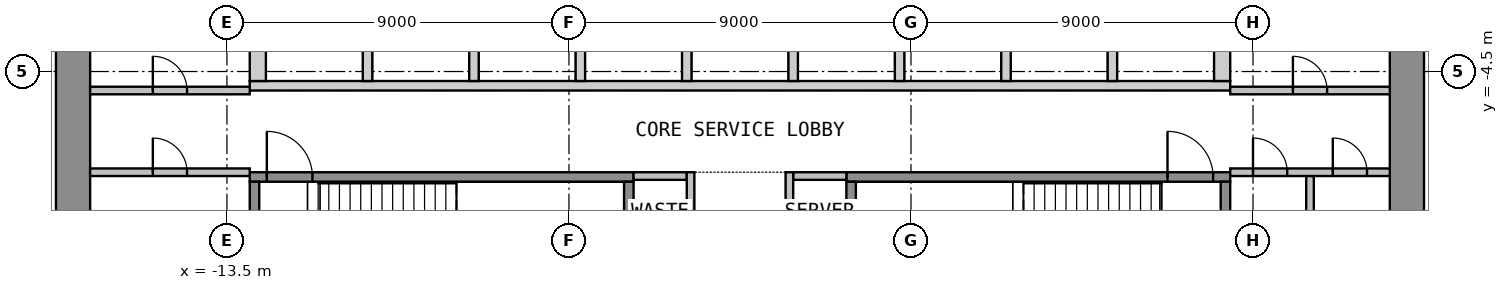
"""IFC4 building model, lengths in metres.
Left out: names, types, materials, properties, quantities, classifications, styles, units other than length and angle.
Written with IfcOpenShell. Run it as: python <this file> out.ifc"""

import sys

from ifc_helpers import new_model, si_unit, direction, frame, frame_2d, origin, place, context, subcontext, project, spatial, polyline, rectangle, outline, extrude, element, fill, save


model = new_model("IFC4")
c1 = context("Model", 3, precision=1e-05, world=origin(), true_north=direction((0.0, 1.0)))
c2 = subcontext(c1, "Body", "Model", "MODEL_VIEW")
j1 = project(units=[si_unit("LENGTHUNIT", "METRE"), si_unit("PLANEANGLEUNIT", "RADIAN")], contexts=[c1])
p1 = place(None, origin())
s1 = spatial("IfcSite", under=j1, at=p1, CompositionType="ELEMENT")
p2 = place(p1, origin())
s2 = spatial("IfcBuilding", under=s1, at=p2, CompositionType="ELEMENT")
p3 = place(p2, frame((0.0, 0.0, 15.6)))
s3 = spatial("IfcBuildingStorey", under=s2, at=p3, CompositionType="ELEMENT", Elevation=15.6)
p4 = place(p3, frame((-17.55, -12.6, 0.0), z_axis=(0.0, 0.0, 1.0), x_axis=(0.0, 1.0, 0.0)))
e1 = element("IfcWall", 1, at=p4, inside=s3, PredefinedType="SHEAR", context=c2, shape_type="SweptSolid", body=[
    extrude(rectangle(XDim=25.2, YDim=0.9, at=frame_2d((12.6, 0.0))), origin(), (0.0, 0.0, 1.0), 4.4),
])
p5 = place(p4, frame((11.4, 0.0, 0.0)))
e2 = element("IfcOpeningElement", 2, at=p5, cuts=e1, PredefinedType="OPENING", context=c2, shape_type="SweptSolid", body=[
    extrude(rectangle(XDim=2.4, YDim=2.1, at=frame_2d((1.2, 1.05))), frame((0.0, 0.46, 0.0), z_axis=(0.0, -1.0, 0.0), x_axis=(1.0, 0.0, 0.0)), (0.0, 0.0, 1.0), 0.92),
])
p6 = place(p3, frame((17.55, -12.6, 0.0), z_axis=(0.0, 0.0, 1.0), x_axis=(0.0, 1.0, 0.0)))
e3 = element("IfcWall", 3, at=p6, inside=s3, PredefinedType="SHEAR", context=c2, shape_type="SweptSolid", body=[
    extrude(rectangle(XDim=25.2, YDim=0.9, at=frame_2d((12.6, 0.0))), origin(), (0.0, 0.0, 1.0), 4.4),
])
p7 = place(p6, frame((11.4, 0.0, 0.0)))
e4 = element("IfcOpeningElement", 4, at=p7, cuts=e3, PredefinedType="OPENING", context=c2, shape_type="SweptSolid", body=[
    extrude(rectangle(XDim=2.4, YDim=2.1, at=frame_2d((1.2, 1.05))), frame((0.0, 0.46, 0.0), z_axis=(0.0, -1.0, 0.0), x_axis=(1.0, 0.0, 0.0)), (0.0, 0.0, 1.0), 0.92),
])
p8 = place(p3, origin())
e5 = element("IfcWall", 5, at=p8, inside=s3, PredefinedType="SHEAR", context=c2, shape_type="SweptSolid", body=[
    extrude(outline(polyline([(-12.9, -5.0), (12.9, -5.0), (12.9, -4.75), (-12.9, -4.75), (-12.9, -5.0)])), origin(), (0.0, 0.0, 1.0), 4.4),
])
p9 = place(p3, origin())
e6 = element("IfcWall", 6, at=p9, inside=s3, PredefinedType="SHEAR", context=c2, shape_type="SweptSolid", body=[
    extrude(outline(polyline([(-12.9, -4.75), (-12.475, -4.75), (-12.475, -2.05), (-12.9, -2.05), (-12.9, -4.75)])), origin(), (0.0, 0.0, 1.0), 4.4),
])
p10 = place(p3, origin())
e7 = element("IfcWall", 7, at=p10, inside=s3, PredefinedType="SHEAR", context=c2, shape_type="SweptSolid", body=[
    extrude(outline(polyline([(-9.925, -4.75), (-9.675, -4.75), (-9.675, -2.05), (-9.925, -2.05), (-9.925, -4.75)])), origin(), (0.0, 0.0, 1.0), 4.4),
])
p11 = place(p3, origin())
e8 = element("IfcWall", 8, at=p11, inside=s3, PredefinedType="SHEAR", context=c2, shape_type="SweptSolid", body=[
    extrude(outline(polyline([(-7.125, -4.75), (-6.875, -4.75), (-6.875, -2.05), (-7.125, -2.05), (-7.125, -4.75)])), origin(), (0.0, 0.0, 1.0), 4.4),
])
p12 = place(p3, origin())
e9 = element("IfcWall", 9, at=p12, inside=s3, PredefinedType="SHEAR", context=c2, shape_type="SweptSolid", body=[
    extrude(outline(polyline([(-4.325, -4.75), (-4.075, -4.75), (-4.075, -2.05), (-4.325, -2.05), (-4.325, -4.75)])), origin(), (0.0, 0.0, 1.0), 4.4),
])
p13 = place(p3, origin())
e10 = element("IfcWall", 10, at=p13, inside=s3, PredefinedType="SHEAR", context=c2, shape_type="SweptSolid", body=[
    extrude(outline(polyline([(-1.525, -4.75), (-1.275, -4.75), (-1.275, -2.05), (-1.525, -2.05), (-1.525, -4.75)])), origin(), (0.0, 0.0, 1.0), 4.4),
])
p14 = place(p3, origin())
e11 = element("IfcWall", 11, at=p14, inside=s3, PredefinedType="SHEAR", context=c2, shape_type="SweptSolid", body=[
    extrude(outline(polyline([(1.275, -4.75), (1.525, -4.75), (1.525, -2.05), (1.275, -2.05), (1.275, -4.75)])), origin(), (0.0, 0.0, 1.0), 4.4),
])
p15 = place(p3, origin())
e12 = element("IfcWall", 12, at=p15, inside=s3, PredefinedType="SHEAR", context=c2, shape_type="SweptSolid", body=[
    extrude(outline(polyline([(4.075, -4.75), (4.325, -4.75), (4.325, -2.05), (4.075, -2.05), (4.075, -4.75)])), origin(), (0.0, 0.0, 1.0), 4.4),
])
p16 = place(p3, origin())
e13 = element("IfcWall", 13, at=p16, inside=s3, PredefinedType="SHEAR", context=c2, shape_type="SweptSolid", body=[
    extrude(outline(polyline([(6.875, -4.75), (7.125, -4.75), (7.125, -2.05), (6.875, -2.05), (6.875, -4.75)])), origin(), (0.0, 0.0, 1.0), 4.4),
])
p17 = place(p3, origin())
e14 = element("IfcWall", 14, at=p17, inside=s3, PredefinedType="SHEAR", context=c2, shape_type="SweptSolid", body=[
    extrude(outline(polyline([(9.675, -4.75), (9.925, -4.75), (9.925, -2.05), (9.675, -2.05), (9.675, -4.75)])), origin(), (0.0, 0.0, 1.0), 4.4),
])
p18 = place(p3, origin())
e15 = element("IfcWall", 15, at=p18, inside=s3, PredefinedType="SHEAR", context=c2, shape_type="SweptSolid", body=[
    extrude(outline(polyline([(12.475, -4.75), (12.9, -4.75), (12.9, -2.05), (12.475, -2.05), (12.475, -4.75)])), origin(), (0.0, 0.0, 1.0), 4.4),
])
p19 = place(p3, frame((-12.9, -7.275, 0.0), z_axis=(0.0, 0.0, 1.0), x_axis=(1.0, 0.0, 0.0)))
e16 = element("IfcWall", 16, at=p19, inside=s3, PredefinedType="SHEAR", context=c2, shape_type="SweptSolid", body=[
    extrude(rectangle(XDim=10.1, YDim=0.25, at=frame_2d((5.05, 0.0))), origin(), (0.0, 0.0, 1.0), 4.4),
])
p20 = place(p19, frame((0.45, 0.0, 0.0)))
e17 = element("IfcOpeningElement", 17, at=p20, cuts=e16, PredefinedType="OPENING", context=c2, shape_type="SweptSolid", body=[
    extrude(rectangle(XDim=1.2, YDim=2.1, at=frame_2d((0.6, 1.05))), frame((0.0, 0.135, 0.0), z_axis=(0.0, -1.0, 0.0), x_axis=(1.0, 0.0, 0.0)), (0.0, 0.0, 1.0), 0.27),
])
for number, where, z_axis, x_axis in (
    (18, (-12.775, -10.65, 0.0), (0.0, 0.0, 1.0), (0.0, 1.0, 0.0)),
    (19, (-2.925, -10.65, 0.0), (0.0, 0.0, 1.0), (0.0, 1.0, 0.0)),
):
    element("IfcWall", number, at=place(p3, frame(where, z_axis=z_axis, x_axis=x_axis)), inside=s3, PredefinedType="SHEAR", context=c2, shape_type="SweptSolid", body=[
        extrude(rectangle(XDim=3.25, YDim=0.25, at=frame_2d((1.625, 0.0))), origin(), (0.0, 0.0, 1.0), 4.4),
    ])
p21 = place(p3, frame((2.8, -7.275, 0.0), z_axis=(0.0, 0.0, 1.0), x_axis=(1.0, 0.0, 0.0)))
e20 = element("IfcWall", 20, at=p21, inside=s3, PredefinedType="SHEAR", context=c2, shape_type="SweptSolid", body=[
    extrude(rectangle(XDim=10.1, YDim=0.25, at=frame_2d((5.05, 0.0))), origin(), (0.0, 0.0, 1.0), 4.4),
])
p22 = place(p21, frame((8.45, 0.0, 0.0)))
e21 = element("IfcOpeningElement", 21, at=p22, cuts=e20, PredefinedType="OPENING", context=c2, shape_type="SweptSolid", body=[
    extrude(rectangle(XDim=1.2, YDim=2.1, at=frame_2d((0.6, 1.05))), frame((0.0, 0.135, 0.0), z_axis=(0.0, -1.0, 0.0), x_axis=(1.0, 0.0, 0.0)), (0.0, 0.0, 1.0), 0.27),
])
for number, where, z_axis, x_axis in (
    (22, (2.925, -10.65, 0.0), (0.0, 0.0, 1.0), (0.0, 1.0, 0.0)),
    (23, (12.775, -10.65, 0.0), (0.0, 0.0, 1.0), (0.0, 1.0, 0.0)),
):
    element("IfcWall", number, at=place(p3, frame(where, z_axis=z_axis, x_axis=x_axis)), inside=s3, PredefinedType="SHEAR", context=c2, shape_type="SweptSolid", body=[
        extrude(rectangle(XDim=3.25, YDim=0.25, at=frame_2d((1.625, 0.0))), origin(), (0.0, 0.0, 1.0), 4.4),
    ])
for number, where, z_axis, x_axis in (
    (24, (-2.8, -7.25, 0.0), (0.0, 0.0, 1.0), (1.0, 0.0, 0.0)),
    (25, (1.4, -7.25, 0.0), (0.0, 0.0, 1.0), (1.0, 0.0, 0.0)),
):
    element("IfcWall", number, at=place(p3, frame(where, z_axis=z_axis, x_axis=x_axis)), inside=s3, PredefinedType="PARTITIONING", context=c2, shape_type="SweptSolid", body=[
        extrude(rectangle(XDim=1.4, YDim=0.2, at=frame_2d((0.7, 0.0))), origin(), (0.0, 0.0, 1.0), 4.4),
    ])
p23 = place(p3, frame((-1.3, -12.6, 0.0), z_axis=(0.0, 0.0, 1.0), x_axis=(0.0, 1.0, 0.0)))
e26 = element("IfcWall", 26, at=p23, inside=s3, PredefinedType="PARTITIONING", context=c2, shape_type="SweptSolid", body=[
    extrude(rectangle(XDim=5.45, YDim=0.2, at=frame_2d((2.725, 0.0))), origin(), (0.0, 0.0, 1.0), 4.4),
])
p24 = place(p23, frame((0.337, 0.0, 0.0)))
e27 = element("IfcOpeningElement", 27, at=p24, cuts=e26, PredefinedType="OPENING", context=c2, shape_type="SweptSolid", body=[
    extrude(rectangle(XDim=0.9, YDim=2.1, at=frame_2d((0.45, 1.05))), frame((0.0, 0.11, 0.0), z_axis=(0.0, -1.0, 0.0), x_axis=(1.0, 0.0, 0.0)), (0.0, 0.0, 1.0), 0.22),
])
p25 = place(p23, frame((2.962, 0.0, 0.0)))
e28 = element("IfcOpeningElement", 28, at=p25, cuts=e26, PredefinedType="OPENING", context=c2, shape_type="SweptSolid", body=[
    extrude(rectangle(XDim=0.9, YDim=2.1, at=frame_2d((0.45, 1.05))), frame((0.0, 0.11, 0.0), z_axis=(0.0, -1.0, 0.0), x_axis=(1.0, 0.0, 0.0)), (0.0, 0.0, 1.0), 0.22),
])
p26 = place(p3, frame((1.3, -12.6, 0.0), z_axis=(0.0, 0.0, 1.0), x_axis=(0.0, 1.0, 0.0)))
e29 = element("IfcWall", 29, at=p26, inside=s3, PredefinedType="PARTITIONING", context=c2, shape_type="SweptSolid", body=[
    extrude(rectangle(XDim=5.45, YDim=0.2, at=frame_2d((2.725, 0.0))), origin(), (0.0, 0.0, 1.0), 4.4),
])
p27 = place(p26, frame((0.337, 0.0, 0.0)))
e30 = element("IfcOpeningElement", 30, at=p27, cuts=e29, PredefinedType="OPENING", context=c2, shape_type="SweptSolid", body=[
    extrude(rectangle(XDim=0.9, YDim=2.1, at=frame_2d((0.45, 1.05))), frame((0.0, 0.11, 0.0), z_axis=(0.0, -1.0, 0.0), x_axis=(1.0, 0.0, 0.0)), (0.0, 0.0, 1.0), 0.22),
])
p28 = place(p26, frame((2.962, 0.0, 0.0)))
e31 = element("IfcOpeningElement", 31, at=p28, cuts=e29, PredefinedType="OPENING", context=c2, shape_type="SweptSolid", body=[
    extrude(rectangle(XDim=0.9, YDim=2.1, at=frame_2d((0.45, 1.05))), frame((0.0, 0.11, 0.0), z_axis=(0.0, -1.0, 0.0), x_axis=(1.0, 0.0, 0.0)), (0.0, 0.0, 1.0), 0.22),
])
p29 = place(p3, frame((-17.1, -7.15, 0.0), z_axis=(0.0, 0.0, 1.0), x_axis=(1.0, 0.0, 0.0)))
e32 = element("IfcWall", 32, at=p29, inside=s3, PredefinedType="PARTITIONING", context=c2, shape_type="SweptSolid", body=[
    extrude(rectangle(XDim=4.2, YDim=0.2, at=frame_2d((2.1, 0.0))), origin(), (0.0, 0.0, 1.0), 4.4),
])
p30 = place(p29, frame((1.65, 0.0, 0.0)))
e33 = element("IfcOpeningElement", 33, at=p30, cuts=e32, PredefinedType="OPENING", context=c2, shape_type="SweptSolid", body=[
    extrude(rectangle(XDim=0.9, YDim=2.1, at=frame_2d((0.45, 1.05))), frame((0.0, 0.11, 0.0), z_axis=(0.0, -1.0, 0.0), x_axis=(1.0, 0.0, 0.0)), (0.0, 0.0, 1.0), 0.22),
])
p31 = place(p3, frame((-17.1, -5.0, 0.0), z_axis=(0.0, 0.0, 1.0), x_axis=(1.0, 0.0, 0.0)))
e34 = element("IfcWall", 34, at=p31, inside=s3, PredefinedType="PARTITIONING", context=c2, shape_type="SweptSolid", body=[
    extrude(rectangle(XDim=4.2, YDim=0.2, at=frame_2d((2.1, 0.0))), origin(), (0.0, 0.0, 1.0), 4.4),
])
p32 = place(p31, frame((1.65, 0.0, 0.0)))
e35 = element("IfcOpeningElement", 35, at=p32, cuts=e34, PredefinedType="OPENING", context=c2, shape_type="SweptSolid", body=[
    extrude(rectangle(XDim=0.9, YDim=2.1, at=frame_2d((0.45, 1.05))), frame((0.0, 0.11, 0.0), z_axis=(0.0, -1.0, 0.0), x_axis=(1.0, 0.0, 0.0)), (0.0, 0.0, 1.0), 0.22),
])
p33 = place(p3, frame((15.0, -12.6, 0.0), z_axis=(0.0, 0.0, 1.0), x_axis=(0.0, 1.0, 0.0)))
e36 = element("IfcWall", 36, at=p33, inside=s3, PredefinedType="PARTITIONING", context=c2, shape_type="SweptSolid", body=[
    extrude(rectangle(XDim=5.45, YDim=0.2, at=frame_2d((2.725, 0.0))), origin(), (0.0, 0.0, 1.0), 4.4),
])
p34 = place(p3, frame((12.9, -7.15, 0.0), z_axis=(0.0, 0.0, 1.0), x_axis=(1.0, 0.0, 0.0)))
e37 = element("IfcWall", 37, at=p34, inside=s3, PredefinedType="PARTITIONING", context=c2, shape_type="SweptSolid", body=[
    extrude(rectangle(XDim=4.2, YDim=0.2, at=frame_2d((2.1, 0.0))), origin(), (0.0, 0.0, 1.0), 4.4),
])
p35 = place(p34, frame((0.6, 0.0, 0.0)))
e38 = element("IfcOpeningElement", 38, at=p35, cuts=e37, PredefinedType="OPENING", context=c2, shape_type="SweptSolid", body=[
    extrude(rectangle(XDim=0.9, YDim=2.1, at=frame_2d((0.45, 1.05))), frame((0.0, 0.11, 0.0), z_axis=(0.0, -1.0, 0.0), x_axis=(1.0, 0.0, 0.0)), (0.0, 0.0, 1.0), 0.22),
])
p36 = place(p34, frame((2.7, 0.0, 0.0)))
e39 = element("IfcOpeningElement", 39, at=p36, cuts=e37, PredefinedType="OPENING", context=c2, shape_type="SweptSolid", body=[
    extrude(rectangle(XDim=0.9, YDim=2.1, at=frame_2d((0.45, 1.05))), frame((0.0, 0.11, 0.0), z_axis=(0.0, -1.0, 0.0), x_axis=(1.0, 0.0, 0.0)), (0.0, 0.0, 1.0), 0.22),
])
p37 = place(p3, frame((12.9, -5.0, 0.0), z_axis=(0.0, 0.0, 1.0), x_axis=(1.0, 0.0, 0.0)))
e40 = element("IfcWall", 40, at=p37, inside=s3, PredefinedType="PARTITIONING", context=c2, shape_type="SweptSolid", body=[
    extrude(rectangle(XDim=4.2, YDim=0.2, at=frame_2d((2.1, 0.0))), origin(), (0.0, 0.0, 1.0), 4.4),
])
p38 = place(p37, frame((1.65, 0.0, 0.0)))
e41 = element("IfcOpeningElement", 41, at=p38, cuts=e40, PredefinedType="OPENING", context=c2, shape_type="SweptSolid", body=[
    extrude(rectangle(XDim=0.9, YDim=2.1, at=frame_2d((0.45, 1.05))), frame((0.0, 0.11, 0.0), z_axis=(0.0, -1.0, 0.0), x_axis=(1.0, 0.0, 0.0)), (0.0, 0.0, 1.0), 0.22),
])
p39 = place(p20, origin())
e42 = element("IfcDoor", 42, at=p39, inside=s3, OperationType="SINGLE_SWING_LEFT", PredefinedType="DOOR", context=c2, shape_type="SweptSolid", body=[
    extrude(rectangle(XDim=1.2, YDim=2.1, at=frame_2d((0.6, 1.05))), frame((0.0, 0.025, 0.0), z_axis=(0.0, -1.0, 0.0), x_axis=(1.0, 0.0, 0.0)), (0.0, 0.0, 1.0), 0.05),
])
fill(e17, e42)
p40 = place(p22, origin())
e43 = element("IfcDoor", 43, at=p40, inside=s3, OperationType="SINGLE_SWING_LEFT", PredefinedType="DOOR", context=c2, shape_type="SweptSolid", body=[
    extrude(rectangle(XDim=1.2, YDim=2.1, at=frame_2d((0.6, 1.05))), frame((0.0, 0.025, 0.0), z_axis=(0.0, -1.0, 0.0), x_axis=(1.0, 0.0, 0.0)), (0.0, 0.0, 1.0), 0.05),
])
fill(e21, e43)
p41 = place(p30, origin())
e44 = element("IfcDoor", 44, at=p41, inside=s3, OperationType="SINGLE_SWING_LEFT", PredefinedType="DOOR", context=c2, shape_type="SweptSolid", body=[
    extrude(rectangle(XDim=0.9, YDim=2.1, at=frame_2d((0.45, 1.05))), frame((0.0, 0.025, 0.0), z_axis=(0.0, -1.0, 0.0), x_axis=(1.0, 0.0, 0.0)), (0.0, 0.0, 1.0), 0.05),
])
fill(e33, e44)
p42 = place(p32, origin())
e45 = element("IfcDoor", 45, at=p42, inside=s3, OperationType="SINGLE_SWING_LEFT", PredefinedType="DOOR", context=c2, shape_type="SweptSolid", body=[
    extrude(rectangle(XDim=0.9, YDim=2.1, at=frame_2d((0.45, 1.05))), frame((0.0, 0.025, 0.0), z_axis=(0.0, -1.0, 0.0), x_axis=(1.0, 0.0, 0.0)), (0.0, 0.0, 1.0), 0.05),
])
fill(e35, e45)
p43 = place(p35, origin())
e46 = element("IfcDoor", 46, at=p43, inside=s3, OperationType="SINGLE_SWING_LEFT", PredefinedType="DOOR", context=c2, shape_type="SweptSolid", body=[
    extrude(rectangle(XDim=0.9, YDim=2.1, at=frame_2d((0.45, 1.05))), frame((0.0, 0.025, 0.0), z_axis=(0.0, -1.0, 0.0), x_axis=(1.0, 0.0, 0.0)), (0.0, 0.0, 1.0), 0.05),
])
fill(e38, e46)
p44 = place(p36, origin())
e47 = element("IfcDoor", 47, at=p44, inside=s3, OperationType="SINGLE_SWING_LEFT", PredefinedType="DOOR", context=c2, shape_type="SweptSolid", body=[
    extrude(rectangle(XDim=0.9, YDim=2.1, at=frame_2d((0.45, 1.05))), frame((0.0, 0.025, 0.0), z_axis=(0.0, -1.0, 0.0), x_axis=(1.0, 0.0, 0.0)), (0.0, 0.0, 1.0), 0.05),
])
fill(e39, e47)
p45 = place(p38, origin())
e48 = element("IfcDoor", 48, at=p45, inside=s3, OperationType="SINGLE_SWING_LEFT", PredefinedType="DOOR", context=c2, shape_type="SweptSolid", body=[
    extrude(rectangle(XDim=0.9, YDim=2.1, at=frame_2d((0.45, 1.05))), frame((0.0, 0.025, 0.0), z_axis=(0.0, -1.0, 0.0), x_axis=(1.0, 0.0, 0.0)), (0.0, 0.0, 1.0), 0.05),
])
fill(e41, e48)
save(model, sys.argv[1])
